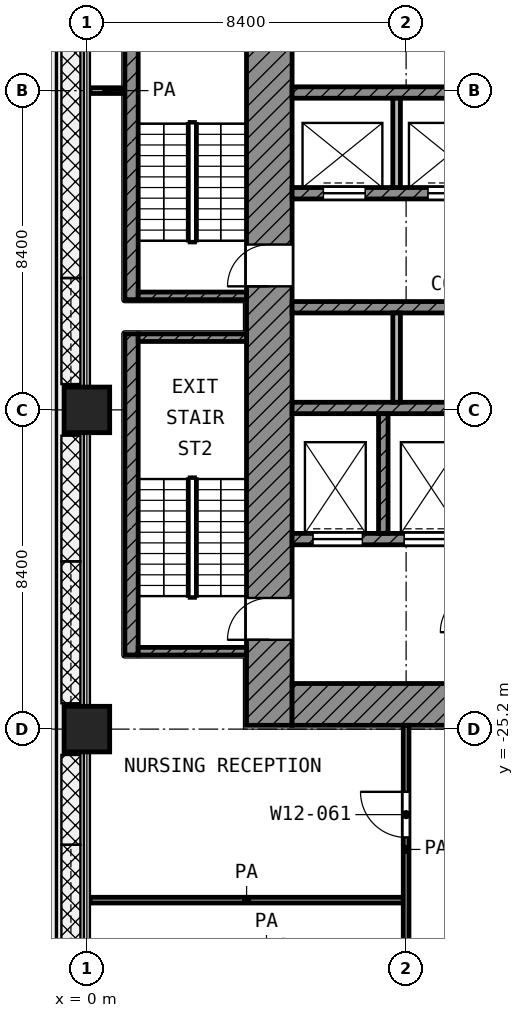
"""IFC4 building model, lengths in metres.
Left out: names, types, materials, properties, quantities, classifications, styles, units other than length and angle.
Written with IfcOpenShell. Run it as: python <this file> out.ifc"""

import sys

from ifc_helpers import new_model, si_unit, direction, frame, frame_2d, origin, origin_2d, place, context, subcontext, project, spatial, rectangle, extrude, element, fill, save


model = new_model("IFC4")
c1 = context("Model", 3, precision=1e-05, world=origin(), true_north=direction((0.0, 1.0)))
c2 = subcontext(c1, "Body", "Model", "MODEL_VIEW")
j1 = project(units=[si_unit("LENGTHUNIT", "METRE"), si_unit("PLANEANGLEUNIT", "RADIAN")], contexts=[c1])
p1 = place(None, origin())
s1 = spatial("IfcSite", under=j1, at=p1, CompositionType="ELEMENT")
p2 = place(p1, origin())
s2 = spatial("IfcBuilding", under=s1, at=p2, CompositionType="ELEMENT")
p3 = place(p2, frame((0.0, 0.0, 77.0)))
s3 = spatial("IfcBuildingStorey", under=s2, at=p3, CompositionType="ELEMENT", Elevation=77.0)
for number, where, z_axis, x_axis in (
    (1, (0.0, -16.8, 0.0), (0.0, 0.0, 1.0), (1.0, 0.0, 0.0)),
    (2, (0.0, -25.2, 0.0), (0.0, 0.0, 1.0), (1.0, 0.0, 0.0)),
):
    element("IfcColumn", number, at=place(p3, frame(where, z_axis=z_axis, x_axis=x_axis)), inside=s3, PredefinedType="COLUMN", context=c2, shape_type="SweptSolid", body=[
        extrude(rectangle(XDim=1.2, YDim=1.2, at=origin_2d()), origin(), (0.0, 0.0, 1.0), 4.2),
    ])
p4 = place(p3, frame((4.8, -25.1, 0.0), z_axis=(0.0, 0.0, 1.0), x_axis=(0.0, 1.0, 0.0)))
e3 = element("IfcWall", 3, at=p4, inside=s3, PredefinedType="SHEAR", context=c2, shape_type="SweptSolid", body=[
    extrude(rectangle(XDim=19.7, YDim=1.2, at=frame_2d((9.85, 0.0))), origin(), (0.0, 0.0, 1.0), 3.9),
])
p5 = place(p4, frame((11.55, 0.0, 0.0)))
e4 = element("IfcOpeningElement", 4, at=p5, cuts=e3, PredefinedType="OPENING", context=c2, shape_type="SweptSolid", body=[
    extrude(rectangle(XDim=1.1, YDim=2.1, at=frame_2d((0.55, 1.05))), frame((0.0, 0.61, 0.0), z_axis=(0.0, -1.0, 0.0), x_axis=(1.0, 0.0, 0.0)), (0.0, 0.0, 1.0), 1.22),
])
p6 = place(p4, frame((2.25, 0.0, 0.0)))
e5 = element("IfcOpeningElement", 5, at=p6, cuts=e3, PredefinedType="OPENING", context=c2, shape_type="SweptSolid", body=[
    extrude(rectangle(XDim=1.1, YDim=2.1, at=frame_2d((0.55, 1.05))), frame((0.0, 0.61, 0.0), z_axis=(0.0, -1.0, 0.0), x_axis=(1.0, 0.0, 0.0)), (0.0, 0.0, 1.0), 1.22),
])
p7 = place(p3, frame((5.4, -24.55, 0.0), z_axis=(0.0, 0.0, 1.0), x_axis=(1.0, 0.0, 0.0)))
e6 = element("IfcWall", 6, at=p7, inside=s3, PredefinedType="SHEAR", context=c2, shape_type="SweptSolid", body=[
    extrude(rectangle(XDim=18.6, YDim=1.1, at=frame_2d((9.3, 0.0))), origin(), (0.0, 0.0, 1.0), 3.9),
])
p8 = place(p7, frame((6.3, 0.0, 0.0)))
e7 = element("IfcOpeningElement", 7, at=p8, cuts=e6, PredefinedType="OPENING", context=c2, shape_type="SweptSolid", body=[
    extrude(rectangle(XDim=1.8, YDim=2.1, at=frame_2d((0.9, 1.05))), frame((0.0, 0.56, 0.0), z_axis=(0.0, -1.0, 0.0), x_axis=(1.0, 0.0, 0.0)), (0.0, 0.0, 1.0), 1.12),
])
p9 = place(p3, frame((5.4, -8.45, 0.0), z_axis=(0.0, 0.0, 1.0), x_axis=(1.0, 0.0, 0.0)))
e8 = element("IfcWall", 8, at=p9, inside=s3, PredefinedType="SHEAR", context=c2, shape_type="SweptSolid", body=[
    extrude(rectangle(XDim=16.65, YDim=0.3, at=frame_2d((8.325, 0.0))), origin(), (0.0, 0.0, 1.0), 3.9),
])
p10 = place(p3, frame((5.4, -11.1, 0.0), z_axis=(0.0, 0.0, 1.0), x_axis=(1.0, 0.0, 0.0)))
e9 = element("IfcWall", 9, at=p10, inside=s3, PredefinedType="SHEAR", context=c2, shape_type="SweptSolid", body=[
    extrude(rectangle(XDim=16.65, YDim=0.3, at=frame_2d((8.325, 0.0))), origin(), (0.0, 0.0, 1.0), 3.9),
])
p11 = place(p10, frame((0.825, 0.0, 0.0)))
e10 = element("IfcOpeningElement", 10, at=p11, cuts=e9, PredefinedType="OPENING", context=c2, shape_type="SweptSolid", body=[
    extrude(rectangle(XDim=1.1, YDim=2.1, at=frame_2d((0.55, 1.05))), frame((0.0, 0.16, 0.0), z_axis=(0.0, -1.0, 0.0), x_axis=(1.0, 0.0, 0.0)), (0.0, 0.0, 1.0), 0.32),
])
p12 = place(p10, frame((3.575, 0.0, 0.0)))
e11 = element("IfcOpeningElement", 11, at=p12, cuts=e9, PredefinedType="OPENING", context=c2, shape_type="SweptSolid", body=[
    extrude(rectangle(XDim=1.1, YDim=2.1, at=frame_2d((0.55, 1.05))), frame((0.0, 0.16, 0.0), z_axis=(0.0, -1.0, 0.0), x_axis=(1.0, 0.0, 0.0)), (0.0, 0.0, 1.0), 0.32),
])
p13 = place(p10, frame((6.325, 0.0, 0.0)))
e12 = element("IfcOpeningElement", 12, at=p13, cuts=e9, PredefinedType="OPENING", context=c2, shape_type="SweptSolid", body=[
    extrude(rectangle(XDim=1.1, YDim=2.1, at=frame_2d((0.55, 1.05))), frame((0.0, 0.16, 0.0), z_axis=(0.0, -1.0, 0.0), x_axis=(1.0, 0.0, 0.0)), (0.0, 0.0, 1.0), 0.32),
])
p14 = place(p10, frame((9.075, 0.0, 0.0)))
e13 = element("IfcOpeningElement", 13, at=p14, cuts=e9, PredefinedType="OPENING", context=c2, shape_type="SweptSolid", body=[
    extrude(rectangle(XDim=1.1, YDim=2.1, at=frame_2d((0.55, 1.05))), frame((0.0, 0.16, 0.0), z_axis=(0.0, -1.0, 0.0), x_axis=(1.0, 0.0, 0.0)), (0.0, 0.0, 1.0), 0.32),
])
for number, where, z_axis, x_axis in (
    (14, (5.4, -14.1, 0.0), (0.0, 0.0, 1.0), (1.0, 0.0, 0.0)),
    (15, (5.4, -16.75, 0.0), (0.0, 0.0, 1.0), (1.0, 0.0, 0.0)),
):
    element("IfcWall", number, at=place(p3, frame(where, z_axis=z_axis, x_axis=x_axis)), inside=s3, PredefinedType="SHEAR", context=c2, shape_type="SweptSolid", body=[
        extrude(rectangle(XDim=16.65, YDim=0.3, at=frame_2d((8.325, 0.0))), origin(), (0.0, 0.0, 1.0), 3.9),
    ])
p15 = place(p3, frame((5.4, -20.2, 0.0), z_axis=(0.0, 0.0, 1.0), x_axis=(1.0, 0.0, 0.0)))
e16 = element("IfcWall", 16, at=p15, inside=s3, PredefinedType="SHEAR", context=c2, shape_type="SweptSolid", body=[
    extrude(rectangle(XDim=14.65, YDim=0.3, at=frame_2d((7.325, 0.0))), origin(), (0.0, 0.0, 1.0), 3.9),
])
p16 = place(p15, frame((10.55, 0.0, 0.0)))
e17 = element("IfcOpeningElement", 17, at=p16, cuts=e16, PredefinedType="OPENING", context=c2, shape_type="SweptSolid", body=[
    extrude(rectangle(XDim=1.3, YDim=2.1, at=frame_2d((0.65, 1.05))), frame((0.0, 0.16, 0.0), z_axis=(0.0, -1.0, 0.0), x_axis=(1.0, 0.0, 0.0)), (0.0, 0.0, 1.0), 0.32),
])
p17 = place(p15, frame((12.95, 0.0, 0.0)))
e18 = element("IfcOpeningElement", 18, at=p17, cuts=e16, PredefinedType="OPENING", context=c2, shape_type="SweptSolid", body=[
    extrude(rectangle(XDim=1.3, YDim=2.1, at=frame_2d((0.65, 1.05))), frame((0.0, 0.16, 0.0), z_axis=(0.0, -1.0, 0.0), x_axis=(1.0, 0.0, 0.0)), (0.0, 0.0, 1.0), 0.32),
])
p18 = place(p15, frame((0.55, 0.0, 0.0)))
e19 = element("IfcOpeningElement", 19, at=p18, cuts=e16, PredefinedType="OPENING", context=c2, shape_type="SweptSolid", body=[
    extrude(rectangle(XDim=1.3, YDim=2.1, at=frame_2d((0.65, 1.05))), frame((0.0, 0.16, 0.0), z_axis=(0.0, -1.0, 0.0), x_axis=(1.0, 0.0, 0.0)), (0.0, 0.0, 1.0), 0.32),
])
p19 = place(p15, frame((2.95, 0.0, 0.0)))
e20 = element("IfcOpeningElement", 20, at=p19, cuts=e16, PredefinedType="OPENING", context=c2, shape_type="SweptSolid", body=[
    extrude(rectangle(XDim=1.3, YDim=2.1, at=frame_2d((0.65, 1.05))), frame((0.0, 0.16, 0.0), z_axis=(0.0, -1.0, 0.0), x_axis=(1.0, 0.0, 0.0)), (0.0, 0.0, 1.0), 0.32),
])
p20 = place(p15, frame((7.15, 0.0, 0.0)))
e21 = element("IfcOpeningElement", 21, at=p20, cuts=e16, PredefinedType="OPENING", context=c2, shape_type="SweptSolid", body=[
    extrude(rectangle(XDim=0.9, YDim=2.1, at=frame_2d((0.45, 1.05))), frame((0.0, 0.16, 0.0), z_axis=(0.0, -1.0, 0.0), x_axis=(1.0, 0.0, 0.0)), (0.0, 0.0, 1.0), 0.32),
])
p21 = place(p3, frame((7.8, -20.05, 0.0), z_axis=(0.0, 0.0, 1.0), x_axis=(0.0, 1.0, 0.0)))
e22 = element("IfcWall", 22, at=p21, inside=s3, PredefinedType="SHEAR", context=c2, shape_type="SweptSolid", body=[
    extrude(rectangle(XDim=3.15, YDim=0.25, at=frame_2d((1.575, 0.0))), origin(), (0.0, 0.0, 1.0), 3.9),
])
p22 = place(p3, frame((8.15, -10.95, 0.0), z_axis=(0.0, 0.0, 1.0), x_axis=(0.0, 1.0, 0.0)))
e23 = element("IfcWall", 23, at=p22, inside=s3, PredefinedType="PARTITIONING", context=c2, shape_type="SweptSolid", body=[
    extrude(rectangle(XDim=2.35, YDim=0.2, at=frame_2d((1.175, 0.0))), origin(), (0.0, 0.0, 1.0), 3.9),
])
p23 = place(p3, frame((8.15, -16.6, 0.0), z_axis=(0.0, 0.0, 1.0), x_axis=(0.0, 1.0, 0.0)))
e24 = element("IfcWall", 24, at=p23, inside=s3, PredefinedType="PARTITIONING", context=c2, shape_type="SweptSolid", body=[
    extrude(rectangle(XDim=2.35, YDim=0.2, at=frame_2d((1.175, 0.0))), origin(), (0.0, 0.0, 1.0), 3.9),
])
p24 = place(p3, frame((1.175, -13.9, 0.0), z_axis=(0.0, 0.0, 1.0), x_axis=(0.0, 1.0, 0.0)))
e25 = element("IfcWall", 25, at=p24, inside=s3, PredefinedType="SHEAR", context=c2, shape_type="SweptSolid", body=[
    extrude(rectangle(XDim=8.45, YDim=0.35, at=frame_2d((4.225, 0.0))), origin(), (0.0, 0.0, 1.0), 3.9),
])
p25 = place(p3, frame((1.35, -13.8, 0.0), z_axis=(0.0, 0.0, 1.0), x_axis=(1.0, 0.0, 0.0)))
e26 = element("IfcWall", 26, at=p25, inside=s3, PredefinedType="SHEAR", context=c2, shape_type="SweptSolid", body=[
    extrude(rectangle(XDim=2.85, YDim=0.2, at=frame_2d((1.425, 0.0))), origin(), (0.0, 0.0, 1.0), 3.9),
])
p26 = place(p3, frame((1.175, -23.25, 0.0), z_axis=(0.0, 0.0, 1.0), x_axis=(0.0, 1.0, 0.0)))
e27 = element("IfcWall", 27, at=p26, inside=s3, PredefinedType="SHEAR", context=c2, shape_type="SweptSolid", body=[
    extrude(rectangle(XDim=8.45, YDim=0.35, at=frame_2d((4.225, 0.0))), origin(), (0.0, 0.0, 1.0), 3.9),
])
for number, where, z_axis, x_axis in (
    (28, (1.35, -14.9, 0.0), (0.0, 0.0, 1.0), (1.0, 0.0, 0.0)),
    (29, (1.35, -23.15, 0.0), (0.0, 0.0, 1.0), (1.0, 0.0, 0.0)),
):
    element("IfcWall", number, at=place(p3, frame(where, z_axis=z_axis, x_axis=x_axis)), inside=s3, PredefinedType="SHEAR", context=c2, shape_type="SweptSolid", body=[
        extrude(rectangle(XDim=2.85, YDim=0.2, at=frame_2d((1.425, 0.0))), origin(), (0.0, 0.0, 1.0), 3.9),
    ])
p27 = place(p3, frame((0.08, -29.7, 0.0), z_axis=(0.0, 0.0, 1.0), x_axis=(1.0, 0.0, 0.0)))
e30 = element("IfcWall", 30, at=p27, inside=s3, PredefinedType="PARTITIONING", context=c2, shape_type="SweptSolid", body=[
    extrude(rectangle(XDim=8.245, YDim=0.15, at=frame_2d((4.123, 0.0))), origin(), (0.0, 0.0, 1.0), 3.9),
])
p28 = place(p3, frame((0.08, -8.4, 0.0), z_axis=(0.0, 0.0, 1.0), x_axis=(1.0, 0.0, 0.0)))
e31 = element("IfcWall", 31, at=p28, inside=s3, PredefinedType="PARTITIONING", context=c2, shape_type="SweptSolid", body=[
    extrude(rectangle(XDim=0.89, YDim=0.15, at=frame_2d((0.445, 0.0))), origin(), (0.0, 0.0, 1.0), 3.9),
])
p29 = place(p3, frame((8.4, -31.632, 0.0), z_axis=(0.0, 0.0, 1.0), x_axis=(0.0, 1.0, 0.0)))
e32 = element("IfcWall", 32, at=p29, inside=s3, PredefinedType="PARTITIONING", context=c2, shape_type="SweptSolid", body=[
    extrude(rectangle(XDim=6.532, YDim=0.15, at=frame_2d((3.266, 0.0))), origin(), (0.0, 0.0, 1.0), 3.9),
])
p30 = place(p29, frame((3.582, 0.0, 0.0)))
e33 = element("IfcOpeningElement", 33, at=p30, cuts=e32, PredefinedType="OPENING", context=c2, shape_type="SweptSolid", body=[
    extrude(rectangle(XDim=1.2, YDim=2.1, at=frame_2d((0.6, 1.05))), frame((0.0, 0.085, 0.0), z_axis=(0.0, -1.0, 0.0), x_axis=(1.0, 0.0, 0.0)), (0.0, 0.0, 1.0), 0.17),
])
p31 = place(p11, origin())
e34 = element("IfcDoor", 34, at=p31, inside=s3, OperationType="DOUBLE_DOOR_SLIDING", PredefinedType="DOOR", context=c2, shape_type="SweptSolid", body=[
    extrude(rectangle(XDim=1.1, YDim=2.1, at=frame_2d((0.55, 1.05))), frame((0.0, 0.025, 0.0), z_axis=(0.0, -1.0, 0.0), x_axis=(1.0, 0.0, 0.0)), (0.0, 0.0, 1.0), 0.05),
])
fill(e10, e34)
p32 = place(p12, origin())
e35 = element("IfcDoor", 35, at=p32, inside=s3, OperationType="DOUBLE_DOOR_SLIDING", PredefinedType="DOOR", context=c2, shape_type="SweptSolid", body=[
    extrude(rectangle(XDim=1.1, YDim=2.1, at=frame_2d((0.55, 1.05))), frame((0.0, 0.025, 0.0), z_axis=(0.0, -1.0, 0.0), x_axis=(1.0, 0.0, 0.0)), (0.0, 0.0, 1.0), 0.05),
])
fill(e11, e35)
p33 = place(p18, origin())
e36 = element("IfcDoor", 36, at=p33, inside=s3, OperationType="DOUBLE_DOOR_SLIDING", PredefinedType="DOOR", context=c2, shape_type="SweptSolid", body=[
    extrude(rectangle(XDim=1.3, YDim=2.1, at=frame_2d((0.65, 1.05))), frame((0.0, 0.025, 0.0), z_axis=(0.0, -1.0, 0.0), x_axis=(1.0, 0.0, 0.0)), (0.0, 0.0, 1.0), 0.05),
])
fill(e19, e36)
p34 = place(p19, origin())
e37 = element("IfcDoor", 37, at=p34, inside=s3, OperationType="DOUBLE_DOOR_SLIDING", PredefinedType="DOOR", context=c2, shape_type="SweptSolid", body=[
    extrude(rectangle(XDim=1.3, YDim=2.1, at=frame_2d((0.65, 1.05))), frame((0.0, 0.025, 0.0), z_axis=(0.0, -1.0, 0.0), x_axis=(1.0, 0.0, 0.0)), (0.0, 0.0, 1.0), 0.05),
])
fill(e20, e37)
p35 = place(p5, origin())
e38 = element("IfcDoor", 38, at=p35, inside=s3, OperationType="SINGLE_SWING_LEFT", PredefinedType="DOOR", context=c2, shape_type="SweptSolid", body=[
    extrude(rectangle(XDim=1.1, YDim=2.1, at=frame_2d((0.55, 1.05))), frame((0.0, 0.025, 0.0), z_axis=(0.0, -1.0, 0.0), x_axis=(1.0, 0.0, 0.0)), (0.0, 0.0, 1.0), 0.05),
])
fill(e4, e38)
p36 = place(p6, origin())
e39 = element("IfcDoor", 39, at=p36, inside=s3, OperationType="SINGLE_SWING_LEFT", PredefinedType="DOOR", context=c2, shape_type="SweptSolid", body=[
    extrude(rectangle(XDim=1.1, YDim=2.1, at=frame_2d((0.55, 1.05))), frame((0.0, 0.025, 0.0), z_axis=(0.0, -1.0, 0.0), x_axis=(1.0, 0.0, 0.0)), (0.0, 0.0, 1.0), 0.05),
])
fill(e5, e39)
p37 = place(p30, origin())
e40 = element("IfcDoor", 40, at=p37, inside=s3, OperationType="SINGLE_SWING_RIGHT", PredefinedType="DOOR", context=c2, shape_type="SweptSolid", body=[
    extrude(rectangle(XDim=1.2, YDim=2.1, at=frame_2d((0.6, 1.05))), frame((0.0, 0.025, 0.0), z_axis=(0.0, -1.0, 0.0), x_axis=(1.0, 0.0, 0.0)), (0.0, 0.0, 1.0), 0.05),
])
fill(e33, e40)
save(model, sys.argv[1])
